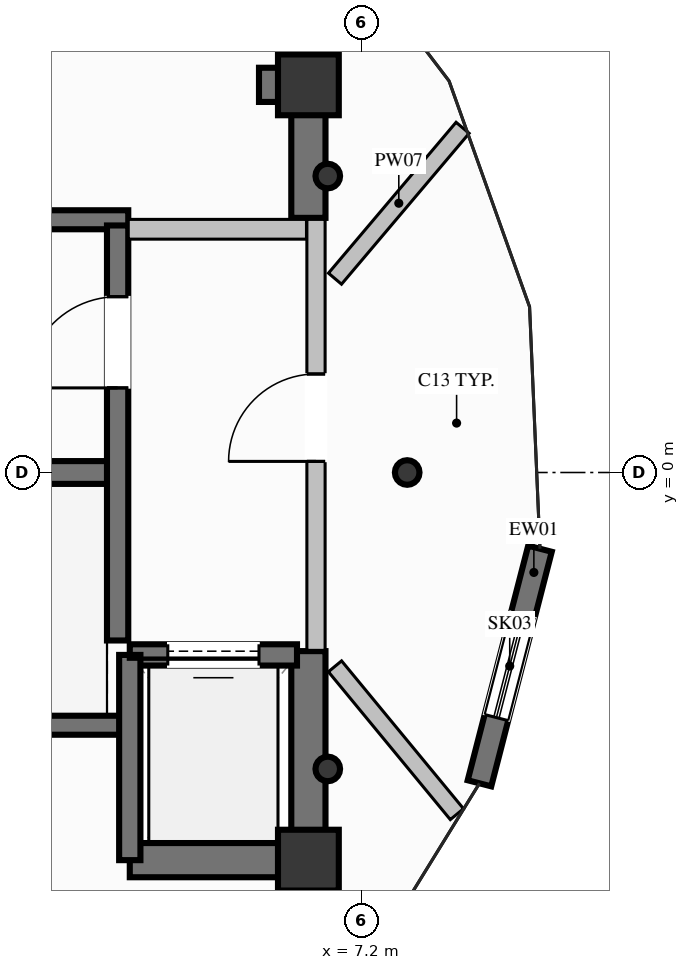
"""IFC4 building model, lengths in metres.
Left out: names, types, materials, properties, quantities, classifications, styles, units other than length and angle.
Written with IfcOpenShell. Run it as: python <this file> out.ifc"""

import sys

from ifc_helpers import new_model, si_unit, direction, frame, frame_2d, origin, origin_2d, place, context, subcontext, project, spatial, rectangle, hollow_circle, extrude, element, fill, save


model = new_model("IFC4")
c1 = context("Model", 3, precision=1e-05, world=origin(), true_north=direction((0.0, 1.0)))
c2 = subcontext(c1, "Body", "Model", "MODEL_VIEW")
j1 = project(units=[si_unit("LENGTHUNIT", "METRE"), si_unit("PLANEANGLEUNIT", "RADIAN")], contexts=[c1])
p1 = place(None, origin())
s1 = spatial("IfcSite", under=j1, at=p1, CompositionType="ELEMENT")
p2 = place(p1, origin())
s2 = spatial("IfcBuilding", under=s1, at=p2, CompositionType="ELEMENT")
p3 = place(p2, frame((0.0, 0.0, 327.4)))
s3 = spatial("IfcBuildingStorey", under=s2, at=p3, CompositionType="ELEMENT", Elevation=327.4)
for number, where, z_axis, x_axis in (
    (1, (6.5, -5.1, 0.0), (0.0, 0.0, 1.0), (1.0, 0.0, 0.0)),
    (2, (6.5, 5.1, 0.0), (0.0, 0.0, 1.0), (1.0, 0.0, 0.0)),
):
    element("IfcColumn", number, at=place(p3, frame(where, z_axis=z_axis, x_axis=x_axis)), inside=s3, PredefinedType="COLUMN", context=c2, shape_type="SweptSolid", body=[
        extrude(rectangle(XDim=0.8, YDim=0.8, at=origin_2d()), origin(), (0.0, 0.0, 1.0), 6.4),
    ])
p4 = place(p3, frame((-3.99, 0.0, 0.0), z_axis=(0.0, 0.0, 1.0), x_axis=(1.0, 0.0, 0.0)))
e3 = element("IfcWall", 3, at=p4, inside=s3, PredefinedType="SHEAR", context=c2, shape_type="SweptSolid", body=[
    extrude(rectangle(XDim=7.98, YDim=0.3, at=frame_2d((3.99, 0.0))), origin(), (0.0, 0.0, 1.0), 6.4),
])
for number, where, z_axis, x_axis in (
    (4, (-4.13, -3.325, 0.0), (0.0, 0.0, 1.0), (1.0, 0.0, 0.0)),
    (5, (-4.13, 3.325, 0.0), (0.0, 0.0, 1.0), (1.0, 0.0, 0.0)),
):
    element("IfcWall", number, at=place(p3, frame(where, z_axis=z_axis, x_axis=x_axis)), inside=s3, PredefinedType="SOLIDWALL", context=c2, shape_type="SweptSolid", body=[
        extrude(rectangle(XDim=8.26, YDim=0.25, at=frame_2d((4.13, 0.0))), origin(), (0.0, 0.0, 1.0), 6.4),
    ])
p5 = place(p3, frame((4.15, -5.1, 0.0), z_axis=(0.0, 0.0, 1.0), x_axis=(1.0, 0.0, 0.0)))
e6 = element("IfcWall", 6, at=p5, inside=s3, PredefinedType="SHEAR", context=c2, shape_type="SweptSolid", body=[
    extrude(rectangle(XDim=2.125, YDim=0.45, at=frame_2d((1.062, 0.0))), origin(), (0.0, 0.0, 1.0), 6.4),
])
p6 = place(p3, frame((5.85, 5.1, 0.0), z_axis=(0.0, 0.0, 1.0), x_axis=(1.0, 0.0, 0.0)))
e7 = element("IfcWall", 7, at=p6, inside=s3, PredefinedType="SHEAR", context=c2, shape_type="SweptSolid", body=[
    extrude(rectangle(XDim=0.425, YDim=0.45, at=frame_2d((0.212, 0.0))), origin(), (0.0, 0.0, 1.0), 6.4),
])
p7 = place(p3, frame((6.5, -5.325, 0.0), z_axis=(0.0, 0.0, 1.0), x_axis=(0.0, 1.0, 0.0)))
e8 = element("IfcWall", 8, at=p7, inside=s3, PredefinedType="SHEAR", context=c2, shape_type="SweptSolid", body=[
    extrude(rectangle(XDim=2.975, YDim=0.45, at=frame_2d((1.487, 0.0))), origin(), (0.0, 0.0, 1.0), 6.4),
])
p8 = place(p3, frame((6.5, 3.35, 0.0), z_axis=(0.0, 0.0, 1.0), x_axis=(0.0, 1.0, 0.0)))
e9 = element("IfcWall", 9, at=p8, inside=s3, PredefinedType="SHEAR", context=c2, shape_type="SweptSolid", body=[
    extrude(rectangle(XDim=1.975, YDim=0.45, at=frame_2d((0.987, 0.0))), origin(), (0.0, 0.0, 1.0), 6.4),
])
for number, where, z_axis, x_axis in (
    (10, (7.8, 0.0, 0.0), (0.0, 0.0, 1.0), (1.0, 0.0, 0.0)),
    (11, (6.755, 3.9, 0.0), (0.0, 0.0, 1.0), (1.0, 0.0, 0.0)),
    (12, (6.755, -3.9, 0.0), (0.0, 0.0, 1.0), (1.0, 0.0, 0.0)),
):
    element("IfcColumn", number, at=place(p3, frame(where, z_axis=z_axis, x_axis=x_axis)), inside=s3, PredefinedType="COLUMN", context=c2, shape_type="SweptSolid", body=[
        extrude(hollow_circle(Radius=0.162, WallThickness=0.014, at=origin_2d()), origin(), (0.0, 0.0, 1.0), 6.4),
    ])
p9 = place(p3, frame((9.547, -1.003, 0.0), z_axis=(0.0, 0.0, 1.0), x_axis=(-0.249792300877, -0.968299440474, 0.0)))
e13 = element("IfcWall", 13, at=p9, inside=s3, PredefinedType="SOLIDWALL", context=c2, shape_type="SweptSolid", body=[
    extrude(rectangle(XDim=3.187, YDim=0.32, at=frame_2d((1.594, 0.0))), origin(), (0.0, 0.0, 1.0), 6.12),
])
p10 = place(p9, frame((0.894, 0.0, 0.6)))
e14 = element("IfcOpeningElement", 14, at=p10, cuts=e13, PredefinedType="OPENING", context=c2, shape_type="SweptSolid", body=[
    extrude(rectangle(XDim=1.4, YDim=1.8, at=frame_2d((0.7, 0.9))), frame((0.0, 0.17, 0.0), z_axis=(0.0, -1.0, 0.0), x_axis=(1.0, 0.0, 0.0)), (0.0, 0.0, 1.0), 0.34),
])
p11 = place(p3, frame((6.35, -2.4, 0.0), z_axis=(0.0, 0.0, 1.0), x_axis=(-1.0, 0.0, 0.0)))
e15 = element("IfcWall", 15, at=p11, inside=s3, PredefinedType="SOLIDWALL", context=c2, shape_type="SweptSolid", body=[
    extrude(rectangle(XDim=2.2, YDim=0.28, at=frame_2d((1.1, 0.0))), origin(), (0.0, 0.0, 1.0), 6.12),
])
p12 = place(p11, frame((0.5, 0.0, 0.0)))
e16 = element("IfcOpeningElement", 16, at=p12, cuts=e15, PredefinedType="OPENING", context=c2, shape_type="SweptSolid", body=[
    extrude(rectangle(XDim=1.2, YDim=2.2, at=frame_2d((0.6, 1.1))), frame((0.0, 0.15, 0.0), z_axis=(0.0, -1.0, 0.0), x_axis=(1.0, 0.0, 0.0)), (0.0, 0.0, 1.0), 0.3),
])
p13 = place(p3, frame((4.15, -2.4, 0.0), z_axis=(0.0, 0.0, 1.0), x_axis=(0.0, -1.0, 0.0)))
e17 = element("IfcWall", 17, at=p13, inside=s3, PredefinedType="SOLIDWALL", context=c2, shape_type="SweptSolid", body=[
    extrude(rectangle(XDim=2.7, YDim=0.28, at=frame_2d((1.35, 0.0))), origin(), (0.0, 0.0, 1.0), 6.12),
])
p14 = place(p3, frame((3.99, -2.21, 0.0), z_axis=(0.0, 0.0, 1.0), x_axis=(0.0, 1.0, 0.0)))
e18 = element("IfcWall", 18, at=p14, inside=s3, PredefinedType="SOLIDWALL", context=c2, shape_type="SweptSolid", body=[
    extrude(rectangle(XDim=5.46, YDim=0.28, at=frame_2d((2.73, 0.0))), origin(), (0.0, 0.0, 1.0), 6.12),
])
p15 = place(p14, frame((3.323, 0.0, 0.0)))
e19 = element("IfcOpeningElement", 19, at=p15, cuts=e18, PredefinedType="OPENING", context=c2, shape_type="SweptSolid", body=[
    extrude(rectangle(XDim=1.2, YDim=2.2, at=frame_2d((0.6, 1.1))), frame((0.0, 0.15, 0.0), z_axis=(0.0, -1.0, 0.0), x_axis=(1.0, 0.0, 0.0)), (0.0, 0.0, 1.0), 0.3),
])
p16 = place(p3, frame((6.6, -2.34, 0.0), z_axis=(0.0, 0.0, 1.0), x_axis=(0.0, 1.0, 0.0)))
e20 = element("IfcWall", 20, at=p16, inside=s3, PredefinedType="PARTITIONING", context=c2, shape_type="SweptSolid", body=[
    extrude(rectangle(XDim=5.67, YDim=0.24, at=frame_2d((2.835, 0.0))), origin(), (0.0, 0.0, 1.0), 5.005),
])
p17 = place(p16, frame((2.486, 0.0, 0.0)))
e21 = element("IfcOpeningElement", 21, at=p17, cuts=e20, PredefinedType="OPENING", context=c2, shape_type="SweptSolid", body=[
    extrude(rectangle(XDim=1.15, YDim=2.2, at=frame_2d((0.575, 1.1))), frame((0.0, 0.13, 0.0), z_axis=(0.0, -1.0, 0.0), x_axis=(1.0, 0.0, 0.0)), (0.0, 0.0, 1.0), 0.26),
])
p18 = place(p3, frame((4.13, 3.2, 0.0), z_axis=(0.0, 0.0, 1.0), x_axis=(1.0, 0.0, 0.0)))
e22 = element("IfcWall", 22, at=p18, inside=s3, PredefinedType="PARTITIONING", context=c2, shape_type="SweptSolid", body=[
    extrude(rectangle(XDim=2.345, YDim=0.26, at=frame_2d((1.173, 0.0))), origin(), (0.0, 0.0, 1.0), 6.12),
])
p19 = place(p3, frame((6.85, 2.55, 0.0), z_axis=(0.0, 0.0, 1.0), x_axis=(0.645820150002, 0.76348957678, 0.0)))
e23 = element("IfcWall", 23, at=p19, inside=s3, PredefinedType="PARTITIONING", context=c2, shape_type="SweptSolid", body=[
    extrude(rectangle(XDim=2.6, YDim=0.225, at=frame_2d((1.3, 0.0))), origin(), (0.0, 0.0, 1.0), 6.12),
])
p20 = place(p3, frame((6.85, -2.55, 0.0), z_axis=(0.0, 0.0, 1.0), x_axis=(0.636223045641, -0.771505175741, 0.0)))
e24 = element("IfcWall", 24, at=p20, inside=s3, PredefinedType="PARTITIONING", context=c2, shape_type="SweptSolid", body=[
    extrude(rectangle(XDim=2.521, YDim=0.225, at=frame_2d((1.261, 0.0))), origin(), (0.0, 0.0, 1.0), 6.12),
])
p21 = place(p10, origin())
e25 = element("IfcWindow", 25, at=p21, inside=s3, PartitioningType="SINGLE_PANEL", PredefinedType="SKYLIGHT", context=c2, shape_type="SweptSolid", body=[
    extrude(rectangle(XDim=1.4, YDim=1.8, at=frame_2d((0.7, 0.9))), frame((0.0, 0.03, 0.0), z_axis=(0.0, -1.0, 0.0), x_axis=(1.0, 0.0, 0.0)), (0.0, 0.0, 1.0), 0.06),
])
fill(e14, e25)
p22 = place(p12, origin())
e26 = element("IfcDoor", 26, at=p22, inside=s3, OperationType="SLIDING_TO_LEFT", PredefinedType="DOOR", context=c2, shape_type="SweptSolid", body=[
    extrude(rectangle(XDim=1.2, YDim=2.2, at=frame_2d((0.6, 1.1))), frame((0.0, 0.025, 0.0), z_axis=(0.0, -1.0, 0.0), x_axis=(1.0, 0.0, 0.0)), (0.0, 0.0, 1.0), 0.05),
])
fill(e16, e26)
p23 = place(p15, origin())
e27 = element("IfcDoor", 27, at=p23, inside=s3, OperationType="SINGLE_SWING_LEFT", PredefinedType="DOOR", context=c2, shape_type="SweptSolid", body=[
    extrude(rectangle(XDim=1.2, YDim=2.2, at=frame_2d((0.6, 1.1))), frame((0.0, 0.025, 0.0), z_axis=(0.0, -1.0, 0.0), x_axis=(1.0, 0.0, 0.0)), (0.0, 0.0, 1.0), 0.05),
])
fill(e19, e27)
p24 = place(p17, origin())
e28 = element("IfcDoor", 28, at=p24, inside=s3, OperationType="SINGLE_SWING_LEFT", PredefinedType="DOOR", context=c2, shape_type="SweptSolid", body=[
    extrude(rectangle(XDim=1.15, YDim=2.2, at=frame_2d((0.575, 1.1))), frame((0.0, 0.025, 0.0), z_axis=(0.0, -1.0, 0.0), x_axis=(1.0, 0.0, 0.0)), (0.0, 0.0, 1.0), 0.05),
])
fill(e21, e28)
save(model, sys.argv[1])
